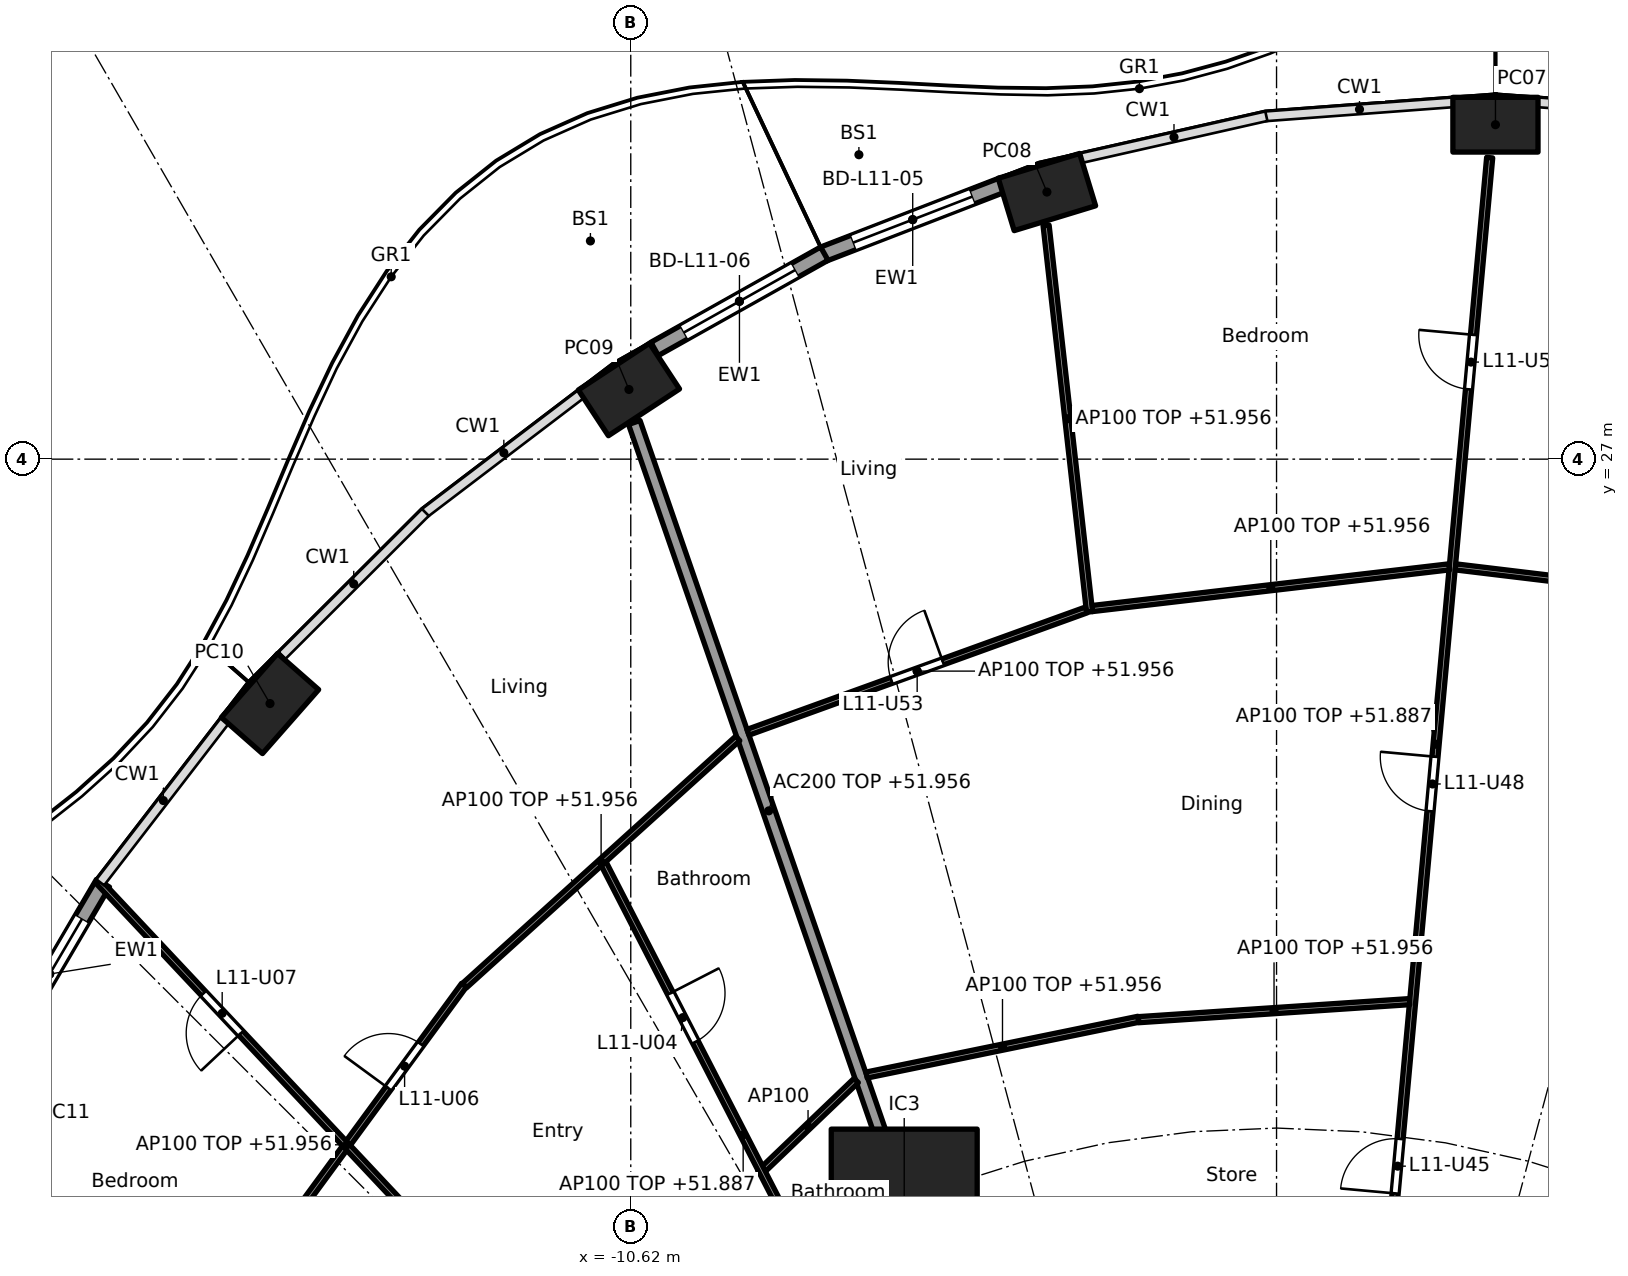
"""IFC4 building model, lengths in metres.
Left out: names, types, materials, properties, quantities, classifications, styles, units other than length and angle.
Written with IfcOpenShell. Run it as: python <this file> out.ifc"""

import sys

from ifc_helpers import new_model, si_unit, direction, frame, frame_2d, origin, origin_2d, place, context, subcontext, project, spatial, rectangle, hollow_rectangle, extrude, element, fill, save


model = new_model("IFC4")
c1 = context("Model", 3, precision=1e-05, world=origin(), true_north=direction((0.0, 1.0)))
c2 = subcontext(c1, "Body", "Model", "MODEL_VIEW")
j1 = project(units=[si_unit("LENGTHUNIT", "METRE"), si_unit("PLANEANGLEUNIT", "RADIAN")], contexts=[c1])
p1 = place(None, origin())
s1 = spatial("IfcSite", under=j1, at=p1, CompositionType="ELEMENT")
p2 = place(p1, origin())
s2 = spatial("IfcBuilding", under=s1, at=p2, CompositionType="ELEMENT")
p3 = place(p2, frame((0.0, 0.0, 49.2)))
s3 = spatial("IfcBuildingStorey", under=s2, at=p3, CompositionType="ELEMENT", Elevation=49.2)
for number, where, z_axis, x_axis in (
    (1, (3.6, 32.5, 0.0), (0.0, 0.0, 1.0), (-1.0, 0.0, 0.0)),
    (2, (-3.776, 31.393, 0.0), (0.0, 0.0, 1.0), (-0.957, -0.292, 0.0)),
    (3, (-10.65, 28.146, 0.0), (0.0, 0.0, 1.0), (-0.836, -0.549, 0.0)),
    (4, (-16.552, 22.981, 0.0), (0.0, 0.0, 1.0), (-0.66, -0.751, 0.0)),
):
    element("IfcColumn", number, at=place(p3, frame(where, z_axis=z_axis, x_axis=x_axis)), inside=s3, PredefinedType="COLUMN", context=c2, shape_type="SweptSolid", body=[
        extrude(hollow_rectangle(XDim=1.4, YDim=0.9, WallThickness=0.05, at=origin_2d()), origin(), (0.0, 0.0, 1.0), 3.7),
    ])
p4 = place(p3, frame((-6.123, 14.782, 0.0), z_axis=(0.0, 0.0, 1.0), x_axis=(1.0, 0.0, 0.0)))
e5 = element("IfcColumn", 5, at=p4, inside=s3, PredefinedType="COLUMN", context=c2, shape_type="SweptSolid", body=[
    extrude(rectangle(XDim=2.4, YDim=2.4, at=origin_2d()), origin(), (0.0, 0.0, 1.0), 3.7),
])
p5 = place(p3, frame((-7.453, 30.371, 0.0), z_axis=(0.0, 0.0, 1.0), x_axis=(0.932809381943, 0.360370166577, 0.0)))
e6 = element("IfcWall", 6, at=p5, inside=s3, PredefinedType="SOLIDWALL", context=c2, shape_type="SweptSolid", body=[
    extrude(rectangle(XDim=3.151, YDim=0.25, at=frame_2d((1.575, 0.0))), origin(), (0.0, 0.0, 1.0), 3.44),
])
p6 = place(p5, frame((0.525, 0.0, 0.0)))
e7 = element("IfcOpeningElement", 7, at=p6, cuts=e6, PredefinedType="OPENING", context=c2, shape_type="SweptSolid", body=[
    extrude(rectangle(XDim=2.1, YDim=2.4, at=frame_2d((1.05, 1.2))), frame((0.0, 0.135, 0.0), z_axis=(0.0, -1.0, 0.0), x_axis=(1.0, 0.0, 0.0)), (0.0, 0.0, 1.0), 0.27),
])
p7 = place(p3, frame((-10.228, 28.812, 0.0), z_axis=(0.0, 0.0, 1.0), x_axis=(0.872084295691, 0.489355679653, 0.0)))
e8 = element("IfcWall", 8, at=p7, inside=s3, PredefinedType="SOLIDWALL", context=c2, shape_type="SweptSolid", body=[
    extrude(rectangle(XDim=3.201, YDim=0.25, at=frame_2d((1.601, 0.0))), origin(), (0.0, 0.0, 1.0), 3.44),
])
p8 = place(p7, frame((0.551, 0.0, 0.0)))
e9 = element("IfcOpeningElement", 9, at=p8, cuts=e8, PredefinedType="OPENING", context=c2, shape_type="SweptSolid", body=[
    extrude(rectangle(XDim=2.1, YDim=2.4, at=frame_2d((1.05, 1.2))), frame((0.0, 0.135, 0.0), z_axis=(0.0, -1.0, 0.0), x_axis=(1.0, 0.0, 0.0)), (0.0, 0.0, 1.0), 0.27),
])
p9 = place(p3, frame((-21.052, 17.04, 0.0), z_axis=(0.0, 0.0, 1.0), x_axis=(0.506311160839, 0.862350861546, 0.0)))
e10 = element("IfcWall", 10, at=p9, inside=s3, PredefinedType="SOLIDWALL", context=c2, shape_type="SweptSolid", body=[
    extrude(rectangle(XDim=3.462, YDim=0.25, at=frame_2d((1.731, 0.0))), origin(), (0.0, 0.0, 1.0), 3.44),
])
p10 = place(p9, frame((0.681, 0.0, 0.0)))
e11 = element("IfcOpeningElement", 11, at=p10, cuts=e10, PredefinedType="OPENING", context=c2, shape_type="SweptSolid", body=[
    extrude(rectangle(XDim=2.1, YDim=2.4, at=frame_2d((1.05, 1.2))), frame((0.0, 0.135, 0.0), z_axis=(0.0, -1.0, 0.0), x_axis=(1.0, 0.0, 0.0)), (0.0, 0.0, 1.0), 0.27),
])
p11 = place(p3, frame((-6.139, 14.829, 0.0), z_axis=(0.0, 0.0, 1.0), x_axis=(-0.327178799566, 0.944962450637, 0.0)))
e12 = element("IfcWall", 12, at=p11, inside=s3, PredefinedType="PARTITIONING", context=c2, shape_type="SweptSolid", body=[
    extrude(rectangle(XDim=13.517, YDim=0.2, at=frame_2d((6.759, 0.0))), origin(), (0.0, 0.0, 1.0), 2.756),
])
p12 = place(p3, frame((8.907, 24.51, 0.0), z_axis=(0.0, 0.0, 1.0), x_axis=(-0.992836798252, 0.119478416615, 0.0)))
e13 = element("IfcWall", 13, at=p12, inside=s3, PredefinedType="PARTITIONING", context=c2, shape_type="SweptSolid", body=[
    extrude(rectangle(XDim=6.01, YDim=0.1, at=frame_2d((3.005, 0.0))), origin(), (0.0, 0.0, 1.0), 2.756),
])
p13 = place(p12, frame((2.555, 0.0, 0.0)))
e14 = element("IfcOpeningElement", 14, at=p13, cuts=e13, PredefinedType="OPENING", context=c2, shape_type="SweptSolid", body=[
    extrude(rectangle(XDim=0.9, YDim=2.1, at=frame_2d((0.45, 1.05))), frame((0.0, 0.06, 0.0), z_axis=(0.0, -1.0, 0.0), x_axis=(1.0, 0.0, 0.0)), (0.0, 0.0, 1.0), 0.12),
])
p14 = place(p3, frame((1.744, 12.664, 0.0), z_axis=(0.0, 0.0, 1.0), x_axis=(0.090893639596, 0.995860605849, 0.0)))
e15 = element("IfcWall", 15, at=p14, inside=s3, PredefinedType="PARTITIONING", context=c2, shape_type="SweptSolid", body=[
    extrude(rectangle(XDim=19.374, YDim=0.1, at=frame_2d((9.687, 0.0))), origin(), (0.0, 0.0, 1.0), 2.687),
])
p15 = place(p14, frame((2.27, 0.0, 0.0)))
e16 = element("IfcOpeningElement", 16, at=p15, cuts=e15, PredefinedType="OPENING", context=c2, shape_type="SweptSolid", body=[
    extrude(rectangle(XDim=0.9, YDim=2.1, at=frame_2d((0.45, 1.05))), frame((0.0, 0.06, 0.0), z_axis=(0.0, -1.0, 0.0), x_axis=(1.0, 0.0, 0.0)), (0.0, 0.0, 1.0), 0.12),
])
p16 = place(p14, frame((8.582, 0.0, 0.0)))
e17 = element("IfcOpeningElement", 17, at=p16, cuts=e15, PredefinedType="OPENING", context=c2, shape_type="SweptSolid", body=[
    extrude(rectangle(XDim=0.9, YDim=2.1, at=frame_2d((0.45, 1.05))), frame((0.0, 0.06, 0.0), z_axis=(0.0, -1.0, 0.0), x_axis=(1.0, 0.0, 0.0)), (0.0, 0.0, 1.0), 0.12),
])
p17 = place(p14, frame((15.548, 0.0, 0.0)))
e18 = element("IfcOpeningElement", 18, at=p17, cuts=e15, PredefinedType="OPENING", context=c2, shape_type="SweptSolid", body=[
    extrude(rectangle(XDim=0.9, YDim=2.1, at=frame_2d((0.45, 1.05))), frame((0.0, 0.06, 0.0), z_axis=(0.0, -1.0, 0.0), x_axis=(1.0, 0.0, 0.0)), (0.0, 0.0, 1.0), 0.12),
])
p18 = place(p3, frame((2.188, 18.079, 0.0), z_axis=(0.0, 0.0, 1.0), x_axis=(-0.997791437766, -0.066424744789, 0.0)))
e19 = element("IfcWall", 19, at=p18, inside=s3, PredefinedType="PARTITIONING", context=c2, shape_type="SweptSolid", body=[
    extrude(rectangle(XDim=4.469, YDim=0.1, at=frame_2d((2.235, 0.0))), origin(), (0.0, 0.0, 1.0), 2.756),
])
p19 = place(p3, frame((2.842, 25.229, 0.0), z_axis=(0.0, 0.0, 1.0), x_axis=(-0.993255612046, -0.115945198862, 0.0)))
e20 = element("IfcWall", 20, at=p19, inside=s3, PredefinedType="PARTITIONING", context=c2, shape_type="SweptSolid", body=[
    extrude(rectangle(XDim=5.913, YDim=0.1, at=frame_2d((2.956, 0.0))), origin(), (0.0, 0.0, 1.0), 2.756),
])
p20 = place(p3, frame((-2.272, 17.789, 0.0), z_axis=(0.0, 0.0, 1.0), x_axis=(-0.979595137747, -0.200981009307, 0.0)))
e21 = element("IfcWall", 21, at=p20, inside=s3, PredefinedType="PARTITIONING", context=c2, shape_type="SweptSolid", body=[
    extrude(rectangle(XDim=4.562, YDim=0.1, at=frame_2d((2.281, 0.0))), origin(), (0.0, 0.0, 1.0), 2.756),
])
p21 = place(p3, frame((-3.075, 24.488, 0.0), z_axis=(0.0, 0.0, 1.0), x_axis=(-0.111705235978, 0.993741384997, 0.0)))
e22 = element("IfcWall", 22, at=p21, inside=s3, PredefinedType="PARTITIONING", context=c2, shape_type="SweptSolid", body=[
    extrude(rectangle(XDim=6.395, YDim=0.1, at=frame_2d((3.198, 0.0))), origin(), (0.0, 0.0, 1.0), 2.756),
])
p22 = place(p3, frame((-3.128, 24.521, 0.0), z_axis=(0.0, 0.0, 1.0), x_axis=(-0.940401494588, -0.340066212636, 0.0)))
e23 = element("IfcWall", 23, at=p22, inside=s3, PredefinedType="PARTITIONING", context=c2, shape_type="SweptSolid", body=[
    extrude(rectangle(XDim=5.917, YDim=0.1, at=frame_2d((2.958, 0.0))), origin(), (0.0, 0.0, 1.0), 2.756),
])
p23 = place(p22, frame((2.509, 0.0, 0.0)))
e24 = element("IfcOpeningElement", 24, at=p23, cuts=e23, PredefinedType="OPENING", context=c2, shape_type="SweptSolid", body=[
    extrude(rectangle(XDim=0.9, YDim=2.1, at=frame_2d((0.45, 1.05))), frame((0.0, 0.06, 0.0), z_axis=(0.0, -1.0, 0.0), x_axis=(1.0, 0.0, 0.0)), (0.0, 0.0, 1.0), 0.12),
])
p24 = place(p3, frame((-6.912, 16.782, 0.0), z_axis=(0.0, 0.0, 1.0), x_axis=(-0.722789289931, -0.691068478778, 0.0)))
e25 = element("IfcWall", 25, at=p24, inside=s3, PredefinedType="PARTITIONING", context=c2, shape_type="SweptSolid", body=[
    extrude(rectangle(XDim=2.194, YDim=0.1, at=frame_2d((1.097, 0.0))), origin(), (0.0, 0.0, 1.0), 3.44),
])
p25 = place(p3, frame((-8.861, 22.407, 0.0), z_axis=(0.0, 0.0, 1.0), x_axis=(-0.741713303551, -0.670717060567, 0.0)))
e26 = element("IfcWall", 26, at=p25, inside=s3, PredefinedType="PARTITIONING", context=c2, shape_type="SweptSolid", body=[
    extrude(rectangle(XDim=6.059, YDim=0.1, at=frame_2d((3.03, 0.0))), origin(), (0.0, 0.0, 1.0), 2.756),
])
p26 = place(p3, frame((-6.477, 11.427, 0.0), z_axis=(0.0, 0.0, 1.0), x_axis=(-0.457464037982, 0.889228122561, 0.0)))
e27 = element("IfcWall", 27, at=p26, inside=s3, PredefinedType="PARTITIONING", context=c2, shape_type="SweptSolid", body=[
    extrude(rectangle(XDim=10.032, YDim=0.1, at=frame_2d((5.016, 0.0))), origin(), (0.0, 0.0, 1.0), 2.687),
])
p27 = place(p26, frame((0.35, 0.0, 0.0)))
e28 = element("IfcOpeningElement", 28, at=p27, cuts=e27, PredefinedType="OPENING", context=c2, shape_type="SweptSolid", body=[
    extrude(rectangle(XDim=0.9, YDim=2.1, at=frame_2d((0.45, 1.05))), frame((0.0, 0.06, 0.0), z_axis=(0.0, -1.0, 0.0), x_axis=(1.0, 0.0, 0.0)), (0.0, 0.0, 1.0), 0.12),
])
p28 = place(p26, frame((6.735, 0.0, 0.0)))
e29 = element("IfcOpeningElement", 29, at=p28, cuts=e27, PredefinedType="OPENING", context=c2, shape_type="SweptSolid", body=[
    extrude(rectangle(XDim=0.9, YDim=2.1, at=frame_2d((0.45, 1.05))), frame((0.0, 0.06, 0.0), z_axis=(0.0, -1.0, 0.0), x_axis=(1.0, 0.0, 0.0)), (0.0, 0.0, 1.0), 0.12),
])
p29 = place(p3, frame((-13.362, 18.35, 0.0), z_axis=(0.0, 0.0, 1.0), x_axis=(-0.591191311491, -0.806531359104, 0.0)))
e30 = element("IfcWall", 30, at=p29, inside=s3, PredefinedType="PARTITIONING", context=c2, shape_type="SweptSolid", body=[
    extrude(rectangle(XDim=6.51, YDim=0.1, at=frame_2d((3.255, 0.0))), origin(), (0.0, 0.0, 1.0), 2.756),
])
p30 = place(p29, frame((1.202, 0.0, 0.0)))
e31 = element("IfcOpeningElement", 31, at=p30, cuts=e30, PredefinedType="OPENING", context=c2, shape_type="SweptSolid", body=[
    extrude(rectangle(XDim=0.9, YDim=2.1, at=frame_2d((0.45, 1.05))), frame((0.0, 0.06, 0.0), z_axis=(0.0, -1.0, 0.0), x_axis=(1.0, 0.0, 0.0)), (0.0, 0.0, 1.0), 0.12),
])
p31 = place(p3, frame((-8.953, 8.958, 0.0), z_axis=(0.0, 0.0, 1.0), x_axis=(-0.684574307023, 0.728943082939, 0.0)))
e32 = element("IfcWall", 32, at=p31, inside=s3, PredefinedType="PARTITIONING", context=c2, shape_type="SweptSolid", body=[
    extrude(rectangle(XDim=15.231, YDim=0.1, at=frame_2d((7.615, 0.0))), origin(), (0.0, 0.0, 1.0), 2.687),
])
p32 = place(p31, frame((1.54, 0.0, 0.0)))
e33 = element("IfcOpeningElement", 33, at=p32, cuts=e32, PredefinedType="OPENING", context=c2, shape_type="SweptSolid", body=[
    extrude(rectangle(XDim=0.9, YDim=2.1, at=frame_2d((0.45, 1.05))), frame((0.0, 0.06, 0.0), z_axis=(0.0, -1.0, 0.0), x_axis=(1.0, 0.0, 0.0)), (0.0, 0.0, 1.0), 0.12),
])
p33 = place(p31, frame((6.174, 0.0, 0.0)))
e34 = element("IfcOpeningElement", 34, at=p33, cuts=e32, PredefinedType="OPENING", context=c2, shape_type="SweptSolid", body=[
    extrude(rectangle(XDim=0.9, YDim=2.1, at=frame_2d((0.45, 1.05))), frame((0.0, 0.06, 0.0), z_axis=(0.0, -1.0, 0.0), x_axis=(1.0, 0.0, 0.0)), (0.0, 0.0, 1.0), 0.12),
])
p34 = place(p31, frame((11.8, 0.0, 0.0)))
e35 = element("IfcOpeningElement", 35, at=p34, cuts=e32, PredefinedType="OPENING", context=c2, shape_type="SweptSolid", body=[
    extrude(rectangle(XDim=0.9, YDim=2.1, at=frame_2d((0.45, 1.05))), frame((0.0, 0.06, 0.0), z_axis=(0.0, -1.0, 0.0), x_axis=(1.0, 0.0, 0.0)), (0.0, 0.0, 1.0), 0.12),
])
p35 = place(p6, origin())
e36 = element("IfcDoor", 36, at=p35, inside=s3, OperationType="SLIDING_TO_LEFT", PredefinedType="DOOR", context=c2, shape_type="SweptSolid", body=[
    extrude(rectangle(XDim=2.1, YDim=2.4, at=frame_2d((1.05, 1.2))), frame((0.0, 0.025, 0.0), z_axis=(0.0, -1.0, 0.0), x_axis=(1.0, 0.0, 0.0)), (0.0, 0.0, 1.0), 0.05),
])
fill(e7, e36)
p36 = place(p8, origin())
e37 = element("IfcDoor", 37, at=p36, inside=s3, OperationType="SLIDING_TO_LEFT", PredefinedType="DOOR", context=c2, shape_type="SweptSolid", body=[
    extrude(rectangle(XDim=2.1, YDim=2.4, at=frame_2d((1.05, 1.2))), frame((0.0, 0.025, 0.0), z_axis=(0.0, -1.0, 0.0), x_axis=(1.0, 0.0, 0.0)), (0.0, 0.0, 1.0), 0.05),
])
fill(e9, e37)
p37 = place(p10, origin())
e38 = element("IfcDoor", 38, at=p37, inside=s3, OperationType="SLIDING_TO_LEFT", PredefinedType="DOOR", context=c2, shape_type="SweptSolid", body=[
    extrude(rectangle(XDim=2.1, YDim=2.4, at=frame_2d((1.05, 1.2))), frame((0.0, 0.025, 0.0), z_axis=(0.0, -1.0, 0.0), x_axis=(1.0, 0.0, 0.0)), (0.0, 0.0, 1.0), 0.05),
])
fill(e11, e38)
p38 = place(p28, frame((0.9, 0.0, 0.0), x_axis=(-1.0, 0.0, 0.0)))
e39 = element("IfcDoor", 39, at=p38, inside=s3, OperationType="SINGLE_SWING_LEFT", PredefinedType="DOOR", context=c2, shape_type="SweptSolid", body=[
    extrude(rectangle(XDim=0.9, YDim=2.1, at=frame_2d((0.45, 1.05))), frame((0.0, 0.025, 0.0), z_axis=(0.0, -1.0, 0.0), x_axis=(1.0, 0.0, 0.0)), (0.0, 0.0, 1.0), 0.05),
])
fill(e29, e39)
p39 = place(p30, frame((0.9, 0.0, 0.0), x_axis=(-1.0, 0.0, 0.0)))
e40 = element("IfcDoor", 40, at=p39, inside=s3, OperationType="SINGLE_SWING_LEFT", PredefinedType="DOOR", context=c2, shape_type="SweptSolid", body=[
    extrude(rectangle(XDim=0.9, YDim=2.1, at=frame_2d((0.45, 1.05))), frame((0.0, 0.025, 0.0), z_axis=(0.0, -1.0, 0.0), x_axis=(1.0, 0.0, 0.0)), (0.0, 0.0, 1.0), 0.05),
])
fill(e31, e40)
p40 = place(p34, origin())
e41 = element("IfcDoor", 41, at=p40, inside=s3, OperationType="SINGLE_SWING_LEFT", PredefinedType="DOOR", context=c2, shape_type="SweptSolid", body=[
    extrude(rectangle(XDim=0.9, YDim=2.1, at=frame_2d((0.45, 1.05))), frame((0.0, 0.025, 0.0), z_axis=(0.0, -1.0, 0.0), x_axis=(1.0, 0.0, 0.0)), (0.0, 0.0, 1.0), 0.05),
])
fill(e35, e41)
p41 = place(p15, origin())
e42 = element("IfcDoor", 42, at=p41, inside=s3, OperationType="SINGLE_SWING_LEFT", PredefinedType="DOOR", context=c2, shape_type="SweptSolid", body=[
    extrude(rectangle(XDim=0.9, YDim=2.1, at=frame_2d((0.45, 1.05))), frame((0.0, 0.025, 0.0), z_axis=(0.0, -1.0, 0.0), x_axis=(1.0, 0.0, 0.0)), (0.0, 0.0, 1.0), 0.05),
])
fill(e16, e42)
p42 = place(p16, origin())
e43 = element("IfcDoor", 43, at=p42, inside=s3, OperationType="SINGLE_SWING_RIGHT", PredefinedType="DOOR", context=c2, shape_type="SweptSolid", body=[
    extrude(rectangle(XDim=0.9, YDim=2.1, at=frame_2d((0.45, 1.05))), frame((0.0, 0.025, 0.0), z_axis=(0.0, -1.0, 0.0), x_axis=(1.0, 0.0, 0.0)), (0.0, 0.0, 1.0), 0.05),
])
fill(e17, e43)
p43 = place(p17, origin())
e44 = element("IfcDoor", 44, at=p43, inside=s3, OperationType="SINGLE_SWING_RIGHT", PredefinedType="DOOR", context=c2, shape_type="SweptSolid", body=[
    extrude(rectangle(XDim=0.9, YDim=2.1, at=frame_2d((0.45, 1.05))), frame((0.0, 0.025, 0.0), z_axis=(0.0, -1.0, 0.0), x_axis=(1.0, 0.0, 0.0)), (0.0, 0.0, 1.0), 0.05),
])
fill(e18, e44)
p44 = place(p23, frame((0.9, 0.0, 0.0), x_axis=(-1.0, 0.0, 0.0)))
e45 = element("IfcDoor", 45, at=p44, inside=s3, OperationType="SINGLE_SWING_RIGHT", PredefinedType="DOOR", context=c2, shape_type="SweptSolid", body=[
    extrude(rectangle(XDim=0.9, YDim=2.1, at=frame_2d((0.45, 1.05))), frame((0.0, 0.025, 0.0), z_axis=(0.0, -1.0, 0.0), x_axis=(1.0, 0.0, 0.0)), (0.0, 0.0, 1.0), 0.05),
])
fill(e24, e45)
save(model, sys.argv[1])
